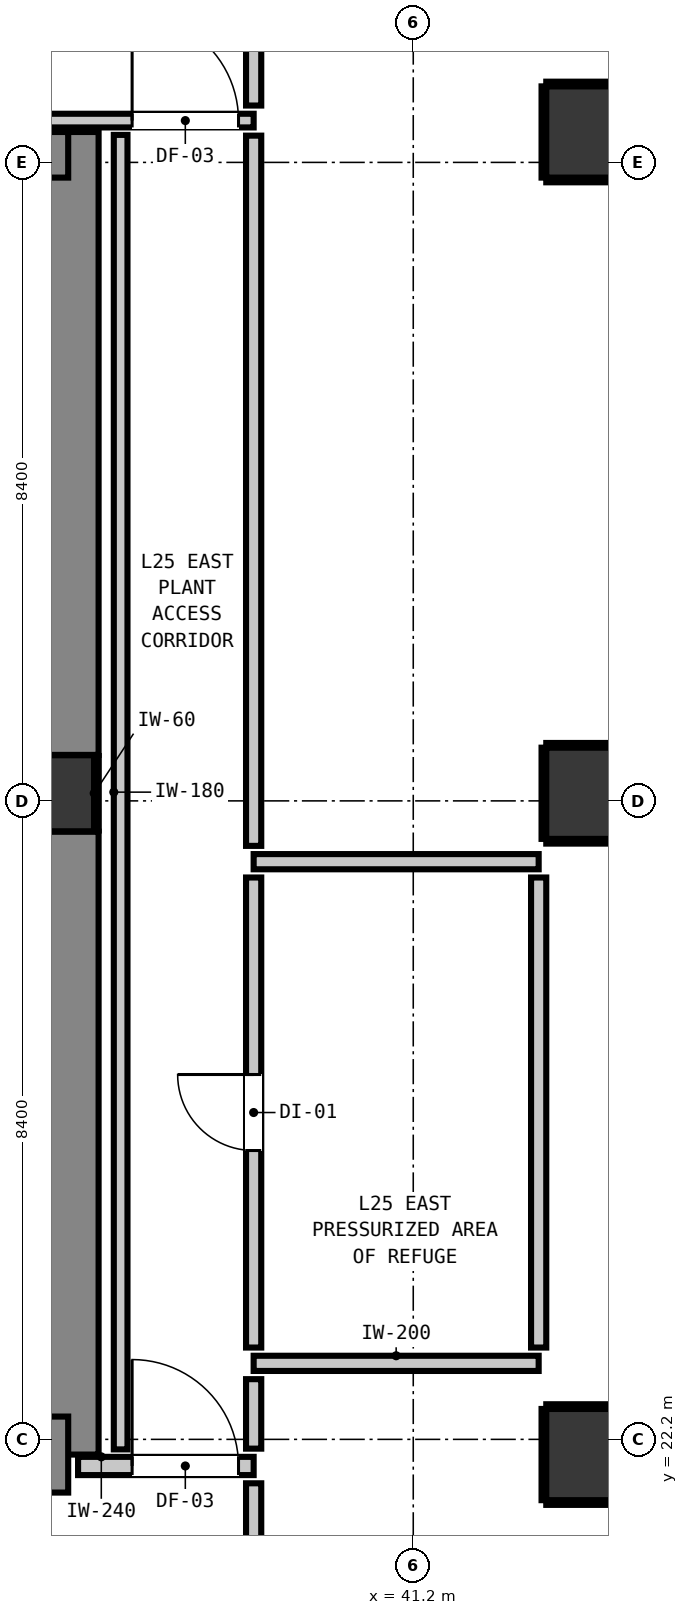
"""IFC4 building model, lengths in metres.
Left out: names, types, materials, properties, quantities, classifications, styles, units other than length and angle.
Written with IfcOpenShell. Run it as: python <this file> out.ifc"""

import sys

from ifc_helpers import new_model, si_unit, direction, frame, frame_2d, origin, origin_2d, place, context, subcontext, project, spatial, rectangle, extrude, element, fill, save


model = new_model("IFC4")
c1 = context("Model", 3, precision=1e-05, world=origin(), true_north=direction((0.0, 1.0)))
c2 = subcontext(c1, "Body", "Model", "MODEL_VIEW")
j1 = project(units=[si_unit("LENGTHUNIT", "METRE"), si_unit("PLANEANGLEUNIT", "RADIAN")], contexts=[c1])
p1 = place(None, origin())
s1 = spatial("IfcSite", under=j1, at=p1, CompositionType="ELEMENT")
p2 = place(p1, origin())
s2 = spatial("IfcBuilding", under=s1, at=p2, CompositionType="ELEMENT")
p3 = place(p2, frame((0.0, 0.0, 88.4)))
s3 = spatial("IfcBuildingStorey", under=s2, at=p3, CompositionType="ELEMENT", Elevation=88.4)
p4 = place(p3, frame((36.5, 30.7, 0.0), z_axis=(0.0, 0.0, 1.0), x_axis=(1.0, 0.0, 0.0)))
e1 = element("IfcColumn", 1, at=p4, inside=s3, PredefinedType="COLUMN", context=c2, shape_type="SweptSolid", body=[
    extrude(rectangle(XDim=1.0, YDim=1.0, at=origin_2d()), origin(), (0.0, 0.0, 1.0), 4.4),
])
p5 = place(p3, frame((36.56, 22.0, 0.0), z_axis=(0.0, 0.0, 1.0), x_axis=(0.0, 1.0, 0.0)))
e2 = element("IfcWall", 2, at=p5, inside=s3, PredefinedType="SHEAR", context=c2, shape_type="SweptSolid", body=[
    extrude(rectangle(XDim=8.195, YDim=1.0, at=frame_2d((4.098, 0.0))), origin(), (0.0, 0.0, 1.0), 4.4),
])
p6 = place(p3, frame((36.56, 31.205, 0.0), z_axis=(0.0, 0.0, 1.0), x_axis=(0.0, 1.0, 0.0)))
e3 = element("IfcWall", 3, at=p6, inside=s3, PredefinedType="SHEAR", context=c2, shape_type="SweptSolid", body=[
    extrude(rectangle(XDim=8.195, YDim=1.0, at=frame_2d((4.097, 0.0))), origin(), (0.0, 0.0, 1.0), 4.4),
])
p7 = place(p3, frame((29.705, 22.0, 0.0), z_axis=(0.0, 0.0, 1.0), x_axis=(1.0, 0.0, 0.0)))
e4 = element("IfcWall", 4, at=p7, inside=s3, PredefinedType="SHEAR", context=c2, shape_type="SweptSolid", body=[
    extrude(rectangle(XDim=6.955, YDim=1.0, at=frame_2d((3.478, 0.0))), origin(), (0.0, 0.0, 1.0), 4.4),
])
p8 = place(p3, frame((32.58, 39.1, 0.0), z_axis=(0.0, 0.0, 1.0), x_axis=(1.0, 0.0, 0.0)))
e5 = element("IfcWall", 5, at=p8, inside=s3, PredefinedType="SHEAR", context=c2, shape_type="SweptSolid", body=[
    extrude(rectangle(XDim=4.08, YDim=0.6, at=frame_2d((2.04, 0.0))), origin(), (0.0, 0.0, 1.0), 4.4),
])
for number, where, z_axis, x_axis in (
    (6, (43.55, 22.0, 0.0), (0.0, 0.0, 1.0), (1.0, 0.0, 0.0)),
    (7, (43.55, 30.7, 0.0), (0.0, 0.0, 1.0), (1.0, 0.0, 0.0)),
    (8, (43.55, 39.4, 0.0), (0.0, 0.0, 1.0), (1.0, 0.0, 0.0)),
):
    element("IfcColumn", number, at=place(p3, frame(where, z_axis=z_axis, x_axis=x_axis)), inside=s3, PredefinedType="COLUMN", context=c2, shape_type="SweptSolid", body=[
        extrude(rectangle(XDim=1.2, YDim=1.2, at=origin_2d()), origin(), (0.0, 0.0, 1.0), 4.4),
    ])
p9 = place(p3, frame((36.79, 21.85, 0.0), z_axis=(0.0, 0.0, 1.0), x_axis=(1.0, 0.0, 0.0)))
e9 = element("IfcWall", 9, at=p9, inside=s3, PredefinedType="PARTITIONING", context=c2, shape_type="SweptSolid", body=[
    extrude(rectangle(XDim=2.31, YDim=0.24, at=frame_2d((1.155, 0.0))), origin(), (0.0, 0.0, 1.0), 3.878),
])
p10 = place(p9, frame((0.711, 0.0, 0.0)))
e10 = element("IfcOpeningElement", 10, at=p10, cuts=e9, PredefinedType="OPENING", context=c2, shape_type="SweptSolid", body=[
    extrude(rectangle(XDim=1.4, YDim=2.15, at=frame_2d((0.7, 1.075))), frame((0.0, 0.13, 0.0), z_axis=(0.0, -1.0, 0.0), x_axis=(1.0, 0.0, 0.0)), (0.0, 0.0, 1.0), 0.26),
])
for number, where, z_axis, x_axis in (
    (11, (39.1, 23.2, 0.0), (0.0, 0.0, 1.0), (1.0, 0.0, 0.0)),
    (12, (39.1, 29.8, 0.0), (0.0, 0.0, 1.0), (1.0, 0.0, 0.0)),
):
    element("IfcWall", number, at=place(p3, frame(where, z_axis=z_axis, x_axis=x_axis)), inside=s3, PredefinedType="PARTITIONING", context=c2, shape_type="SweptSolid", body=[
        extrude(rectangle(XDim=3.75, YDim=0.2, at=frame_2d((1.875, 0.0))), origin(), (0.0, 0.0, 1.0), 4.14),
    ])
p11 = place(p3, frame((29.802, 39.55, 0.0), z_axis=(0.0, 0.0, 1.0), x_axis=(1.0, 0.0, 0.0)))
e13 = element("IfcWall", 13, at=p11, inside=s3, PredefinedType="PARTITIONING", context=c2, shape_type="SweptSolid", body=[
    extrude(rectangle(XDim=9.298, YDim=0.18, at=frame_2d((4.649, 0.0))), origin(), (0.0, 0.0, 1.0), 3.878),
])
p12 = place(p11, frame((7.699, 0.0, 0.0)))
e14 = element("IfcOpeningElement", 14, at=p12, cuts=e13, PredefinedType="OPENING", context=c2, shape_type="SweptSolid", body=[
    extrude(rectangle(XDim=1.4, YDim=2.15, at=frame_2d((0.7, 1.075))), frame((0.0, 0.1, 0.0), z_axis=(0.0, -1.0, 0.0), x_axis=(1.0, 0.0, 0.0)), (0.0, 0.0, 1.0), 0.2),
])
p13 = place(p3, frame((39.1, 20.308, 0.0), z_axis=(0.0, 0.0, 1.0), x_axis=(0.0, 1.0, 0.0)))
e15 = element("IfcWall", 15, at=p13, inside=s3, PredefinedType="PARTITIONING", context=c2, shape_type="SweptSolid", body=[
    extrude(rectangle(XDim=1.314, YDim=0.2, at=frame_2d((0.657, 0.0))), origin(), (0.0, 0.0, 1.0), 4.14),
])
p14 = place(p3, frame((39.1, 22.078, 0.0), z_axis=(0.0, 0.0, 1.0), x_axis=(0.0, 1.0, 0.0)))
e16 = element("IfcWall", 16, at=p14, inside=s3, PredefinedType="PARTITIONING", context=c2, shape_type="SweptSolid", body=[
    extrude(rectangle(XDim=0.914, YDim=0.2, at=frame_2d((0.457, 0.0))), origin(), (0.0, 0.0, 1.0), 4.14),
])
p15 = place(p3, frame((39.1, 23.408, 0.0), z_axis=(0.0, 0.0, 1.0), x_axis=(0.0, 1.0, 0.0)))
e17 = element("IfcWall", 17, at=p15, inside=s3, PredefinedType="PARTITIONING", context=c2, shape_type="SweptSolid", body=[
    extrude(rectangle(XDim=6.184, YDim=0.2, at=frame_2d((3.092, 0.0))), origin(), (0.0, 0.0, 1.0), 4.14),
])
p16 = place(p15, frame((2.592, 0.0, 0.0)))
e18 = element("IfcOpeningElement", 18, at=p16, cuts=e17, PredefinedType="OPENING", context=c2, shape_type="SweptSolid", body=[
    extrude(rectangle(XDim=1.0, YDim=2.15, at=frame_2d((0.5, 1.075))), frame((0.0, 0.11, 0.0), z_axis=(0.0, -1.0, 0.0), x_axis=(1.0, 0.0, 0.0)), (0.0, 0.0, 1.0), 0.22),
])
p17 = place(p3, frame((39.1, 30.008, 0.0), z_axis=(0.0, 0.0, 1.0), x_axis=(0.0, 1.0, 0.0)))
e19 = element("IfcWall", 19, at=p17, inside=s3, PredefinedType="PARTITIONING", context=c2, shape_type="SweptSolid", body=[
    extrude(rectangle(XDim=9.344, YDim=0.2, at=frame_2d((4.672, 0.0))), origin(), (0.0, 0.0, 1.0), 4.14),
])
p18 = place(p3, frame((39.1, 39.748, 0.0), z_axis=(0.0, 0.0, 1.0), x_axis=(0.0, 1.0, 0.0)))
e20 = element("IfcWall", 20, at=p18, inside=s3, PredefinedType="PARTITIONING", context=c2, shape_type="SweptSolid", body=[
    extrude(rectangle(XDim=1.344, YDim=0.2, at=frame_2d((0.672, 0.0))), origin(), (0.0, 0.0, 1.0), 4.14),
])
p19 = place(p3, frame((42.85, 23.408, 0.0), z_axis=(0.0, 0.0, 1.0), x_axis=(0.0, 1.0, 0.0)))
e21 = element("IfcWall", 21, at=p19, inside=s3, PredefinedType="PARTITIONING", context=c2, shape_type="SweptSolid", body=[
    extrude(rectangle(XDim=6.184, YDim=0.2, at=frame_2d((3.092, 0.0))), origin(), (0.0, 0.0, 1.0), 4.14),
])
p20 = place(p3, frame((37.35, 22.068, 0.0), z_axis=(0.0, 0.0, 1.0), x_axis=(0.0, 1.0, 0.0)))
e22 = element("IfcWall", 22, at=p20, inside=s3, PredefinedType="PARTITIONING", context=c2, shape_type="SweptSolid", body=[
    extrude(rectangle(XDim=17.294, YDim=0.18, at=frame_2d((8.647, 0.0))), origin(), (0.0, 0.0, 1.0), 4.14),
])
p21 = place(p3, frame((37.032, 30.21, 0.0), z_axis=(0.0, 0.0, 1.0), x_axis=(0.0, 1.0, 0.0)))
e23 = element("IfcWall", 23, at=p21, inside=s3, PredefinedType="PARTITIONING", context=c2, shape_type="SweptSolid", body=[
    extrude(rectangle(XDim=0.98, YDim=0.06, at=frame_2d((0.49, 0.0))), origin(), (0.0, 0.0, 1.0), 1.45),
])
for number, where, z_axis, x_axis in (
    (24, (42.95, 21.368, 0.0), (0.0, 0.0, 1.0), (1.0, 0.0, 0.0)),
    (25, (42.95, 22.632, 0.0), (0.0, 0.0, 1.0), (1.0, 0.0, 0.0)),
):
    element("IfcWall", number, at=place(p3, frame(where, z_axis=z_axis, x_axis=x_axis)), inside=s3, PredefinedType="PARTITIONING", context=c2, shape_type="SweptSolid", body=[
        extrude(rectangle(XDim=1.02, YDim=0.06, at=frame_2d((0.51, 0.0))), origin(), (0.0, 0.0, 1.0), 1.45),
    ])
p22 = place(p3, frame((42.918, 21.4, 0.0), z_axis=(0.0, 0.0, 1.0), x_axis=(0.0, 1.0, 0.0)))
e26 = element("IfcWall", 26, at=p22, inside=s3, PredefinedType="PARTITIONING", context=c2, shape_type="SweptSolid", body=[
    extrude(rectangle(XDim=1.2, YDim=0.06, at=frame_2d((0.6, 0.0))), origin(), (0.0, 0.0, 1.0), 1.45),
])
for number, where, z_axis, x_axis in (
    (27, (42.95, 30.068, 0.0), (0.0, 0.0, 1.0), (1.0, 0.0, 0.0)),
    (28, (42.95, 31.332, 0.0), (0.0, 0.0, 1.0), (1.0, 0.0, 0.0)),
):
    element("IfcWall", number, at=place(p3, frame(where, z_axis=z_axis, x_axis=x_axis)), inside=s3, PredefinedType="PARTITIONING", context=c2, shape_type="SweptSolid", body=[
        extrude(rectangle(XDim=1.02, YDim=0.06, at=frame_2d((0.51, 0.0))), origin(), (0.0, 0.0, 1.0), 1.45),
    ])
p23 = place(p3, frame((42.918, 30.1, 0.0), z_axis=(0.0, 0.0, 1.0), x_axis=(0.0, 1.0, 0.0)))
e29 = element("IfcWall", 29, at=p23, inside=s3, PredefinedType="PARTITIONING", context=c2, shape_type="SweptSolid", body=[
    extrude(rectangle(XDim=1.2, YDim=0.06, at=frame_2d((0.6, 0.0))), origin(), (0.0, 0.0, 1.0), 1.45),
])
for number, where, z_axis, x_axis in (
    (30, (42.95, 38.768, 0.0), (0.0, 0.0, 1.0), (1.0, 0.0, 0.0)),
    (31, (42.95, 40.032, 0.0), (0.0, 0.0, 1.0), (1.0, 0.0, 0.0)),
):
    element("IfcWall", number, at=place(p3, frame(where, z_axis=z_axis, x_axis=x_axis)), inside=s3, PredefinedType="PARTITIONING", context=c2, shape_type="SweptSolid", body=[
        extrude(rectangle(XDim=1.02, YDim=0.06, at=frame_2d((0.51, 0.0))), origin(), (0.0, 0.0, 1.0), 1.45),
    ])
p24 = place(p3, frame((42.918, 38.8, 0.0), z_axis=(0.0, 0.0, 1.0), x_axis=(0.0, 1.0, 0.0)))
e32 = element("IfcWall", 32, at=p24, inside=s3, PredefinedType="PARTITIONING", context=c2, shape_type="SweptSolid", body=[
    extrude(rectangle(XDim=1.2, YDim=0.06, at=frame_2d((0.6, 0.0))), origin(), (0.0, 0.0, 1.0), 1.45),
])
p25 = place(p10, origin())
e33 = element("IfcDoor", 33, at=p25, inside=s3, OperationType="SINGLE_SWING_LEFT", PredefinedType="DOOR", context=c2, shape_type="SweptSolid", body=[
    extrude(rectangle(XDim=1.4, YDim=2.15, at=frame_2d((0.7, 1.075))), frame((0.0, 0.025, 0.0), z_axis=(0.0, -1.0, 0.0), x_axis=(1.0, 0.0, 0.0)), (0.0, 0.0, 1.0), 0.05),
])
fill(e10, e33)
p26 = place(p12, origin())
e34 = element("IfcDoor", 34, at=p26, inside=s3, OperationType="SINGLE_SWING_LEFT", PredefinedType="DOOR", context=c2, shape_type="SweptSolid", body=[
    extrude(rectangle(XDim=1.4, YDim=2.15, at=frame_2d((0.7, 1.075))), frame((0.0, 0.025, 0.0), z_axis=(0.0, -1.0, 0.0), x_axis=(1.0, 0.0, 0.0)), (0.0, 0.0, 1.0), 0.05),
])
fill(e14, e34)
p27 = place(p16, origin())
e35 = element("IfcDoor", 35, at=p27, inside=s3, OperationType="SINGLE_SWING_RIGHT", PredefinedType="DOOR", context=c2, shape_type="SweptSolid", body=[
    extrude(rectangle(XDim=1.0, YDim=2.15, at=frame_2d((0.5, 1.075))), frame((0.0, 0.025, 0.0), z_axis=(0.0, -1.0, 0.0), x_axis=(1.0, 0.0, 0.0)), (0.0, 0.0, 1.0), 0.05),
])
fill(e18, e35)
save(model, sys.argv[1])
